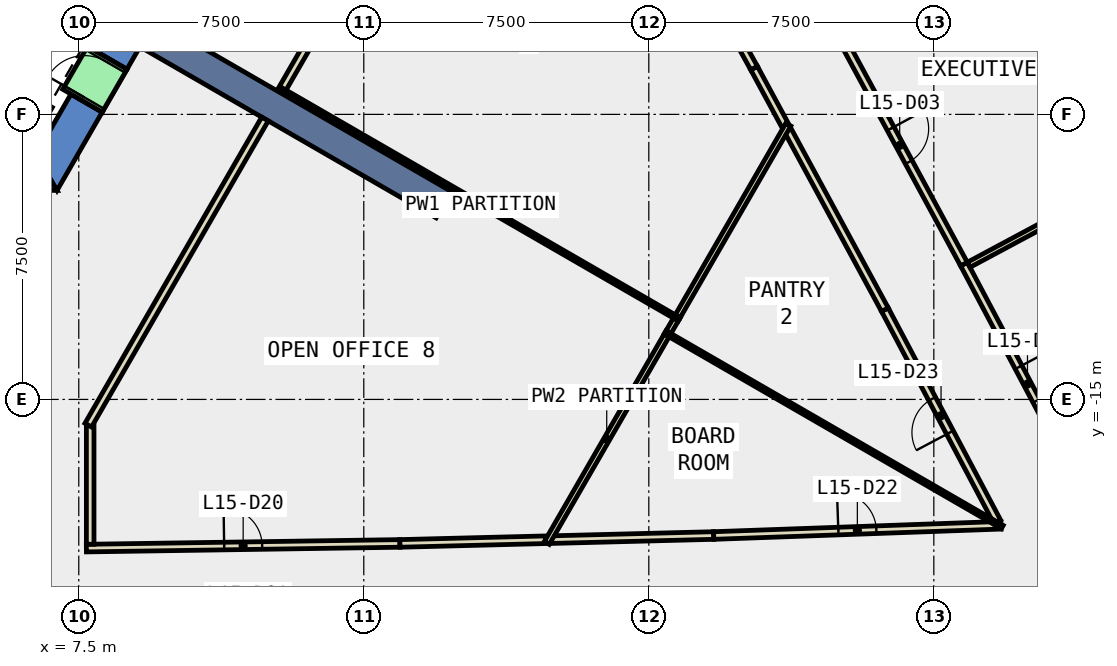
"""IFC4 building model, lengths in metres.
Left out: names, types, materials, properties, quantities, classifications, styles, units other than length and angle.
Written with IfcOpenShell. Run it as: python <this file> out.ifc"""

import sys

from ifc_helpers import new_model, si_unit, direction, frame, frame_2d, origin, place, context, subcontext, project, spatial, polyline, rectangle, outline, extrude, element, fill, save


model = new_model("IFC4")
c1 = context("Model", 3, precision=1e-05, world=origin(), true_north=direction((0.0, 1.0)))
c2 = subcontext(c1, "Body", "Model", "MODEL_VIEW")
j1 = project(units=[si_unit("LENGTHUNIT", "METRE"), si_unit("PLANEANGLEUNIT", "RADIAN")], contexts=[c1])
p1 = place(None, origin())
s1 = spatial("IfcSite", under=j1, at=p1, CompositionType="ELEMENT")
p2 = place(p1, origin())
s2 = spatial("IfcBuilding", under=s1, at=p2, CompositionType="ELEMENT")
p3 = place(p2, frame((0.0, 0.0, 72.8)))
s3 = spatial("IfcBuildingStorey", under=s2, at=p3, CompositionType="ELEMENT", Elevation=72.8)
p4 = place(p3, frame((0.0, 0.0, -0.4)))
e1 = element("IfcWall", 1, at=p4, inside=s3, PredefinedType="SHEAR", context=c2, shape_type="SweptSolid", body=[
    extrude(outline(polyline([(5.75, -8.55), (5.75, -9.5), (6.928, -9.5), (6.38, -8.55), (5.75, -8.55)])), origin(), (0.0, 0.0, 1.0), 4.2),
])
p5 = place(p3, frame((0.0, 0.0, -0.4)))
e2 = element("IfcWall", 2, at=p5, inside=s3, PredefinedType="SHEAR", context=c2, shape_type="SweptSolid", body=[
    extrude(outline(polyline([(8.117, -7.44), (7.295, -6.965), (6.38, -8.55), (6.928, -9.5), (8.117, -7.44)])), origin(), (0.0, 0.0, 1.0), 4.2),
])
p6 = place(p3, frame((0.0, 0.0, -0.4)))
e3 = element("IfcWall", 3, at=p6, inside=s3, PredefinedType="SHEAR", context=c2, shape_type="SweptSolid", body=[
    extrude(outline(polyline([(9.417, -5.189), (8.594, -4.714), (7.945, -5.839), (8.767, -6.314), (9.417, -5.189)])), origin(), (0.0, 0.0, 1.0), 4.2),
])
p7 = place(p3, frame((0.0, 0.0, 3.6)))
e4 = element("IfcWall", 4, at=p7, inside=s3, PredefinedType="SHEAR", context=c2, shape_type="SweptSolid", body=[
    extrude(outline(polyline([(8.767, -6.314), (7.945, -5.839), (7.295, -6.965), (8.117, -7.44), (8.767, -6.314)])), origin(), (0.0, 0.0, 1.0), 0.2),
])
p8 = place(p3, frame((9.31, -5.375, -0.4), z_axis=(0.0, 0.0, 1.0), x_axis=(0.866017533419, -0.500013631625, 0.0)))
e5 = element("IfcWall", 5, at=p8, inside=s3, PredefinedType="SHEAR", context=c2, shape_type="SweptSolid", body=[
    extrude(rectangle(XDim=9.0, YDim=0.8, at=frame_2d((4.5, 0.0))), origin(), (0.0, 0.0, 1.0), 4.2),
])
p9 = place(p3, frame((7.7, -18.912, 0.0), z_axis=(0.0, 0.0, 1.0), x_axis=(0.999888819649, 0.014911349423, 0.0)))
e6 = element("IfcWall", 6, at=p9, inside=s3, PredefinedType="PARTITIONING", context=c2, shape_type="SweptSolid", body=[
    extrude(rectangle(XDim=8.252, YDim=0.2, at=frame_2d((4.126, 0.0))), origin(), (0.0, 0.0, 1.0), 3.8),
])
p10 = place(p9, frame((3.626, 0.0, 0.0)))
e7 = element("IfcOpeningElement", 7, at=p10, cuts=e6, PredefinedType="OPENING", context=c2, shape_type="SweptSolid", body=[
    extrude(rectangle(XDim=1.0, YDim=2.1, at=frame_2d((0.5, 1.05))), frame((0.0, 0.11, 0.0), z_axis=(0.0, -1.0, 0.0), x_axis=(1.0, 0.0, 0.0)), (0.0, 0.0, 1.0), 0.22),
])
p11 = place(p3, frame((15.951, -18.789, 0.0), z_axis=(0.0, 0.0, 1.0), x_axis=(0.999680018084, 0.025295482688, 0.0)))
e8 = element("IfcWall", 8, at=p11, inside=s3, PredefinedType="PARTITIONING", context=c2, shape_type="SweptSolid", body=[
    extrude(rectangle(XDim=3.841, YDim=0.2, at=frame_2d((1.921, 0.0))), origin(), (0.0, 0.0, 1.0), 3.8),
])
p12 = place(p3, frame((26.086, -7.789, 0.0), z_axis=(0.0, 0.0, 1.0), x_axis=(-0.475856505621, 0.879522930945, 0.0)))
e9 = element("IfcWall", 9, at=p12, inside=s3, PredefinedType="PARTITIONING", context=c2, shape_type="SweptSolid", body=[
    extrude(rectangle(XDim=1.715, YDim=0.2, at=frame_2d((0.857, 0.0))), origin(), (0.0, 0.0, 1.0), 3.8),
])
p13 = place(p3, frame((25.27, -6.281, 0.0), z_axis=(0.0, 0.0, 1.0), x_axis=(-0.484062485326, 0.875033433818, 0.0)))
e10 = element("IfcWall", 10, at=p13, inside=s3, PredefinedType="PARTITIONING", context=c2, shape_type="SweptSolid", body=[
    extrude(rectangle(XDim=7.23, YDim=0.2, at=frame_2d((3.615, 0.0))), origin(), (0.0, 0.0, 1.0), 3.8),
])
p14 = place(p13, frame((3.115, 0.0, 0.0)))
e11 = element("IfcOpeningElement", 11, at=p14, cuts=e10, PredefinedType="OPENING", context=c2, shape_type="SweptSolid", body=[
    extrude(rectangle(XDim=1.0, YDim=2.1, at=frame_2d((0.5, 1.05))), frame((0.0, 0.11, 0.0), z_axis=(0.0, -1.0, 0.0), x_axis=(1.0, 0.0, 0.0)), (0.0, 0.0, 1.0), 0.22),
])
p15 = place(p3, frame((19.941, -18.689, 0.0), z_axis=(0.0, 0.0, 1.0), x_axis=(0.999680388185, 0.025280852018, 0.0)))
e12 = element("IfcWall", 12, at=p15, inside=s3, PredefinedType="PARTITIONING", context=c2, shape_type="SweptSolid", body=[
    extrude(rectangle(XDim=4.269, YDim=0.2, at=frame_2d((2.134, 0.0))), origin(), (0.0, 0.0, 1.0), 3.8),
])
p16 = place(p3, frame((24.208, -18.581, 0.0), z_axis=(0.0, 0.0, 1.0), x_axis=(0.99936260762, 0.035698438215, 0.0)))
e13 = element("IfcWall", 13, at=p16, inside=s3, PredefinedType="PARTITIONING", context=c2, shape_type="SweptSolid", body=[
    extrude(rectangle(XDim=7.564, YDim=0.2, at=frame_2d((3.782, 0.0))), origin(), (0.0, 0.0, 1.0), 3.8),
])
p17 = place(p16, frame((3.282, 0.0, 0.0)))
e14 = element("IfcOpeningElement", 14, at=p17, cuts=e13, PredefinedType="OPENING", context=c2, shape_type="SweptSolid", body=[
    extrude(rectangle(XDim=1.0, YDim=2.1, at=frame_2d((0.5, 1.05))), frame((0.0, 0.11, 0.0), z_axis=(0.0, -1.0, 0.0), x_axis=(1.0, 0.0, 0.0)), (0.0, 0.0, 1.0), 0.22),
])
p18 = place(p3, frame((31.668, -18.219, 0.0), z_axis=(0.0, 0.0, 1.0), x_axis=(-0.468058220157, 0.883697630722, 0.0)))
e15 = element("IfcWall", 15, at=p18, inside=s3, PredefinedType="PARTITIONING", context=c2, shape_type="SweptSolid", body=[
    extrude(rectangle(XDim=6.316, YDim=0.2, at=frame_2d((3.158, 0.0))), origin(), (0.0, 0.0, 1.0), 3.8),
])
p19 = place(p18, frame((2.658, 0.0, 0.0)))
e16 = element("IfcOpeningElement", 16, at=p19, cuts=e15, PredefinedType="OPENING", context=c2, shape_type="SweptSolid", body=[
    extrude(rectangle(XDim=1.0, YDim=2.1, at=frame_2d((0.5, 1.05))), frame((0.0, 0.11, 0.0), z_axis=(0.0, -1.0, 0.0), x_axis=(1.0, 0.0, 0.0)), (0.0, 0.0, 1.0), 0.22),
])
p20 = place(p3, frame((28.712, -12.638, 0.0), z_axis=(0.0, 0.0, 1.0), x_axis=(-0.476123321927, 0.8793785205, 0.0)))
e17 = element("IfcWall", 17, at=p20, inside=s3, PredefinedType="PARTITIONING", context=c2, shape_type="SweptSolid", body=[
    extrude(rectangle(XDim=5.364, YDim=0.2, at=frame_2d((2.682, 0.0))), origin(), (0.0, 0.0, 1.0), 3.8),
])
p21 = place(p3, frame((30.793, -11.439, 0.0), z_axis=(0.0, 0.0, 1.0), x_axis=(0.468043291185, -0.883705537822, 0.0)))
e18 = element("IfcWall", 18, at=p21, inside=s3, PredefinedType="PARTITIONING", context=c2, shape_type="SweptSolid", body=[
    extrude(rectangle(XDim=7.066, YDim=0.2, at=frame_2d((3.533, 0.0))), origin(), (0.0, 0.0, 1.0), 3.8),
])
p22 = place(p21, frame((3.071, 0.0, 0.0)))
e19 = element("IfcOpeningElement", 19, at=p22, cuts=e18, PredefinedType="OPENING", context=c2, shape_type="SweptSolid", body=[
    extrude(rectangle(XDim=1.0, YDim=2.1, at=frame_2d((0.5, 1.05))), frame((0.0, 0.11, 0.0), z_axis=(0.0, -1.0, 0.0), x_axis=(1.0, 0.0, 0.0)), (0.0, 0.0, 1.0), 0.22),
])
p23 = place(p3, frame((27.339, -5.062, 0.0), z_axis=(0.0, 0.0, 1.0), x_axis=(0.476248444599, -0.879310763619, 0.0)))
e20 = element("IfcWall", 20, at=p23, inside=s3, PredefinedType="PARTITIONING", context=c2, shape_type="SweptSolid", body=[
    extrude(rectangle(XDim=7.252, YDim=0.2, at=frame_2d((3.626, 0.0))), origin(), (0.0, 0.0, 1.0), 3.8),
])
p24 = place(p23, frame((3.201, 0.0, 0.0)))
e21 = element("IfcOpeningElement", 21, at=p24, cuts=e20, PredefinedType="OPENING", context=c2, shape_type="SweptSolid", body=[
    extrude(rectangle(XDim=1.0, YDim=2.1, at=frame_2d((0.5, 1.05))), frame((0.0, 0.11, 0.0), z_axis=(0.0, -1.0, 0.0), x_axis=(1.0, 0.0, 0.0)), (0.0, 0.0, 1.0), 0.22),
])
p25 = place(p3, frame((7.8, -15.69, 0.0), z_axis=(0.0, 0.0, 1.0), x_axis=(0.0, -1.0, 0.0)))
e22 = element("IfcWall", 22, at=p25, inside=s3, PredefinedType="PARTITIONING", context=c2, shape_type="SweptSolid", body=[
    extrude(rectangle(XDim=3.121, YDim=0.2, at=frame_2d((1.561, 0.0))), origin(), (0.0, 0.0, 1.0), 3.8),
])
p26 = place(p3, frame((12.4, -7.621, 0.0), z_axis=(0.0, 0.0, 1.0), x_axis=(-0.49990497871, -0.866080257402, 0.0)))
e23 = element("IfcWall", 23, at=p26, inside=s3, PredefinedType="PARTITIONING", context=c2, shape_type="SweptSolid", body=[
    extrude(rectangle(XDim=9.302, YDim=0.2, at=frame_2d((4.651, 0.0))), origin(), (0.0, 0.0, 1.0), 3.8),
])
p27 = place(p3, frame((19.374, 4.458, 0.0), z_axis=(0.0, 0.0, 1.0), x_axis=(-0.499973880856, -0.866040483154, 0.0)))
e24 = element("IfcWall", 24, at=p27, inside=s3, PredefinedType="PARTITIONING", context=c2, shape_type="SweptSolid", body=[
    extrude(rectangle(XDim=13.113, YDim=0.2, at=frame_2d((6.556, 0.0))), origin(), (0.0, 0.0, 1.0), 3.8),
])
p28 = place(p3, frame((12.843, -6.855, 0.0), z_axis=(0.0, 0.0, 1.0), x_axis=(0.866054959007, -0.499948805358, 0.0)))
e25 = element("IfcWall", 25, at=p28, inside=s3, PredefinedType="PARTITIONING", context=c2, shape_type="SweptSolid", body=[
    extrude(rectangle(XDim=12.075, YDim=0.1, at=frame_2d((6.038, 0.0))), origin(), (0.0, 0.0, 1.0), 3.8),
])
p29 = place(p3, frame((22.969, -13.316, 0.0), z_axis=(0.0, 0.0, 1.0), x_axis=(-0.500007312183, -0.866021182053, 0.0)))
e26 = element("IfcWall", 26, at=p29, inside=s3, PredefinedType="PARTITIONING", context=c2, shape_type="SweptSolid", body=[
    extrude(rectangle(XDim=6.306, YDim=0.15, at=frame_2d((3.153, 0.0))), origin(), (0.0, 0.0, 1.0), 3.8),
])
p30 = place(p3, frame((23.211, -12.898, 0.0), z_axis=(0.0, 0.0, 1.0), x_axis=(-0.501488909663, -0.865164073159, 0.0)))
e27 = element("IfcWall", 27, at=p30, inside=s3, PredefinedType="PARTITIONING", context=c2, shape_type="SweptSolid", body=[
    extrude(rectangle(XDim=0.383, YDim=0.15, at=frame_2d((0.191, 0.0))), origin(), (0.0, 0.0, 1.0), 3.8),
])
p31 = place(p3, frame((26.172, -7.768, 0.0), z_axis=(0.0, 0.0, 1.0), x_axis=(-0.499945058274, -0.866057122081, 0.0)))
e28 = element("IfcWall", 28, at=p31, inside=s3, PredefinedType="PARTITIONING", context=c2, shape_type="SweptSolid", body=[
    extrude(rectangle(XDim=5.823, YDim=0.15, at=frame_2d((2.912, 0.0))), origin(), (0.0, 0.0, 1.0), 3.8),
])
p32 = place(p3, frame((22.929, -13.235, 0.0), z_axis=(0.0, 0.0, 1.0), x_axis=(0.866003823807, -0.500037375755, 0.0)))
e29 = element("IfcWall", 29, at=p32, inside=s3, PredefinedType="PARTITIONING", context=c2, shape_type="SweptSolid", body=[
    extrude(rectangle(XDim=10.245, YDim=0.1, at=frame_2d((5.123, 0.0))), origin(), (0.0, 0.0, 1.0), 3.8),
])
p33 = place(p3, frame((30.916, -11.458, 0.0), z_axis=(0.0, 0.0, 1.0), x_axis=(0.881525059883, 0.472137235132, 0.0)))
e30 = element("IfcWall", 30, at=p33, inside=s3, PredefinedType="PARTITIONING", context=c2, shape_type="SweptSolid", body=[
    extrude(rectangle(XDim=6.68, YDim=0.15, at=frame_2d((3.34, 0.0))), origin(), (0.0, 0.0, 1.0), 3.8),
])
p34 = place(p3, frame((4.451, -6.19, 0.0), z_axis=(0.0, 0.0, 1.0), x_axis=(0.50000090737, 0.866024879913, 0.0)))
e31 = element("IfcWall", 31, at=p34, inside=s3, PredefinedType="STANDARD", context=c2, shape_type="SweptSolid", body=[
    extrude(rectangle(XDim=10.6, YDim=0.2, at=frame_2d((5.3, 0.0))), origin(), (0.0, 0.0, 1.0), 3.8),
])
p35 = place(p3, frame((4.588, -6.153, 0.0), z_axis=(0.0, 0.0, 1.0), x_axis=(0.866022959057, -0.500004234368, 0.0)))
e32 = element("IfcWall", 32, at=p35, inside=s3, PredefinedType="STANDARD", context=c2, shape_type="SweptSolid", body=[
    extrude(rectangle(XDim=2.5, YDim=0.2, at=frame_2d((1.25, 0.0))), origin(), (0.0, 0.0, 1.0), 3.8),
])
p36 = place(p3, frame((7.598, -7.14, 0.0), z_axis=(0.0, 0.0, 1.0), x_axis=(0.500362116554, 0.865816234728, 0.0)))
e33 = element("IfcWall", 33, at=p36, inside=s3, PredefinedType="STANDARD", context=c2, shape_type="SweptSolid", body=[
    extrude(rectangle(XDim=1.299, YDim=1.2, at=frame_2d((0.65, 0.0))), origin(), (0.0, 0.0, 1.0), 2.4),
])
p37 = place(p36, frame((0.1, 0.0, 0.0)))
e34 = element("IfcOpeningElement", 34, at=p37, cuts=e33, PredefinedType="OPENING", context=c2, shape_type="SweptSolid", body=[
    extrude(rectangle(XDim=1.1, YDim=2.3, at=frame_2d((0.55, 1.15))), frame((0.0, 0.61, 0.0), z_axis=(0.0, -1.0, 0.0), x_axis=(1.0, 0.0, 0.0)), (0.0, 0.0, 1.0), 1.22),
])
p38 = place(p22, origin())
e35 = element("IfcDoor", 35, at=p38, inside=s3, OperationType="SINGLE_SWING_RIGHT", PredefinedType="DOOR", context=c2, shape_type="SweptSolid", body=[
    extrude(rectangle(XDim=1.0, YDim=2.1, at=frame_2d((0.5, 1.05))), frame((0.0, 0.025, 0.0), z_axis=(0.0, -1.0, 0.0), x_axis=(1.0, 0.0, 0.0)), (0.0, 0.0, 1.0), 0.05),
])
fill(e19, e35)
p39 = place(p24, origin())
e36 = element("IfcDoor", 36, at=p39, inside=s3, OperationType="SINGLE_SWING_LEFT", PredefinedType="DOOR", context=c2, shape_type="SweptSolid", body=[
    extrude(rectangle(XDim=1.0, YDim=2.1, at=frame_2d((0.5, 1.05))), frame((0.0, 0.025, 0.0), z_axis=(0.0, -1.0, 0.0), x_axis=(1.0, 0.0, 0.0)), (0.0, 0.0, 1.0), 0.05),
])
fill(e21, e36)
p40 = place(p10, origin())
e37 = element("IfcDoor", 37, at=p40, inside=s3, OperationType="SINGLE_SWING_RIGHT", PredefinedType="DOOR", context=c2, shape_type="SweptSolid", body=[
    extrude(rectangle(XDim=1.0, YDim=2.1, at=frame_2d((0.5, 1.05))), frame((0.0, 0.025, 0.0), z_axis=(0.0, -1.0, 0.0), x_axis=(1.0, 0.0, 0.0)), (0.0, 0.0, 1.0), 0.05),
])
fill(e7, e37)
p41 = place(p17, origin())
e38 = element("IfcDoor", 38, at=p41, inside=s3, OperationType="SINGLE_SWING_LEFT", PredefinedType="DOOR", context=c2, shape_type="SweptSolid", body=[
    extrude(rectangle(XDim=1.0, YDim=2.1, at=frame_2d((0.5, 1.05))), frame((0.0, 0.025, 0.0), z_axis=(0.0, -1.0, 0.0), x_axis=(1.0, 0.0, 0.0)), (0.0, 0.0, 1.0), 0.05),
])
fill(e14, e38)
p42 = place(p19, origin())
e39 = element("IfcDoor", 39, at=p42, inside=s3, OperationType="SINGLE_SWING_LEFT", PredefinedType="DOOR", context=c2, shape_type="SweptSolid", body=[
    extrude(rectangle(XDim=1.0, YDim=2.1, at=frame_2d((0.5, 1.05))), frame((0.0, 0.025, 0.0), z_axis=(0.0, -1.0, 0.0), x_axis=(1.0, 0.0, 0.0)), (0.0, 0.0, 1.0), 0.05),
])
fill(e16, e39)
p43 = place(p37, origin())
e40 = element("IfcDoor", 40, at=p43, inside=s3, OperationType="SLIDING_TO_LEFT", PredefinedType="DOOR", context=c2, shape_type="SweptSolid", body=[
    extrude(rectangle(XDim=1.1, YDim=2.3, at=frame_2d((0.55, 1.15))), frame((0.0, 0.025, 0.0), z_axis=(0.0, -1.0, 0.0), x_axis=(1.0, 0.0, 0.0)), (0.0, 0.0, 1.0), 0.05),
])
fill(e34, e40)
save(model, sys.argv[1])
